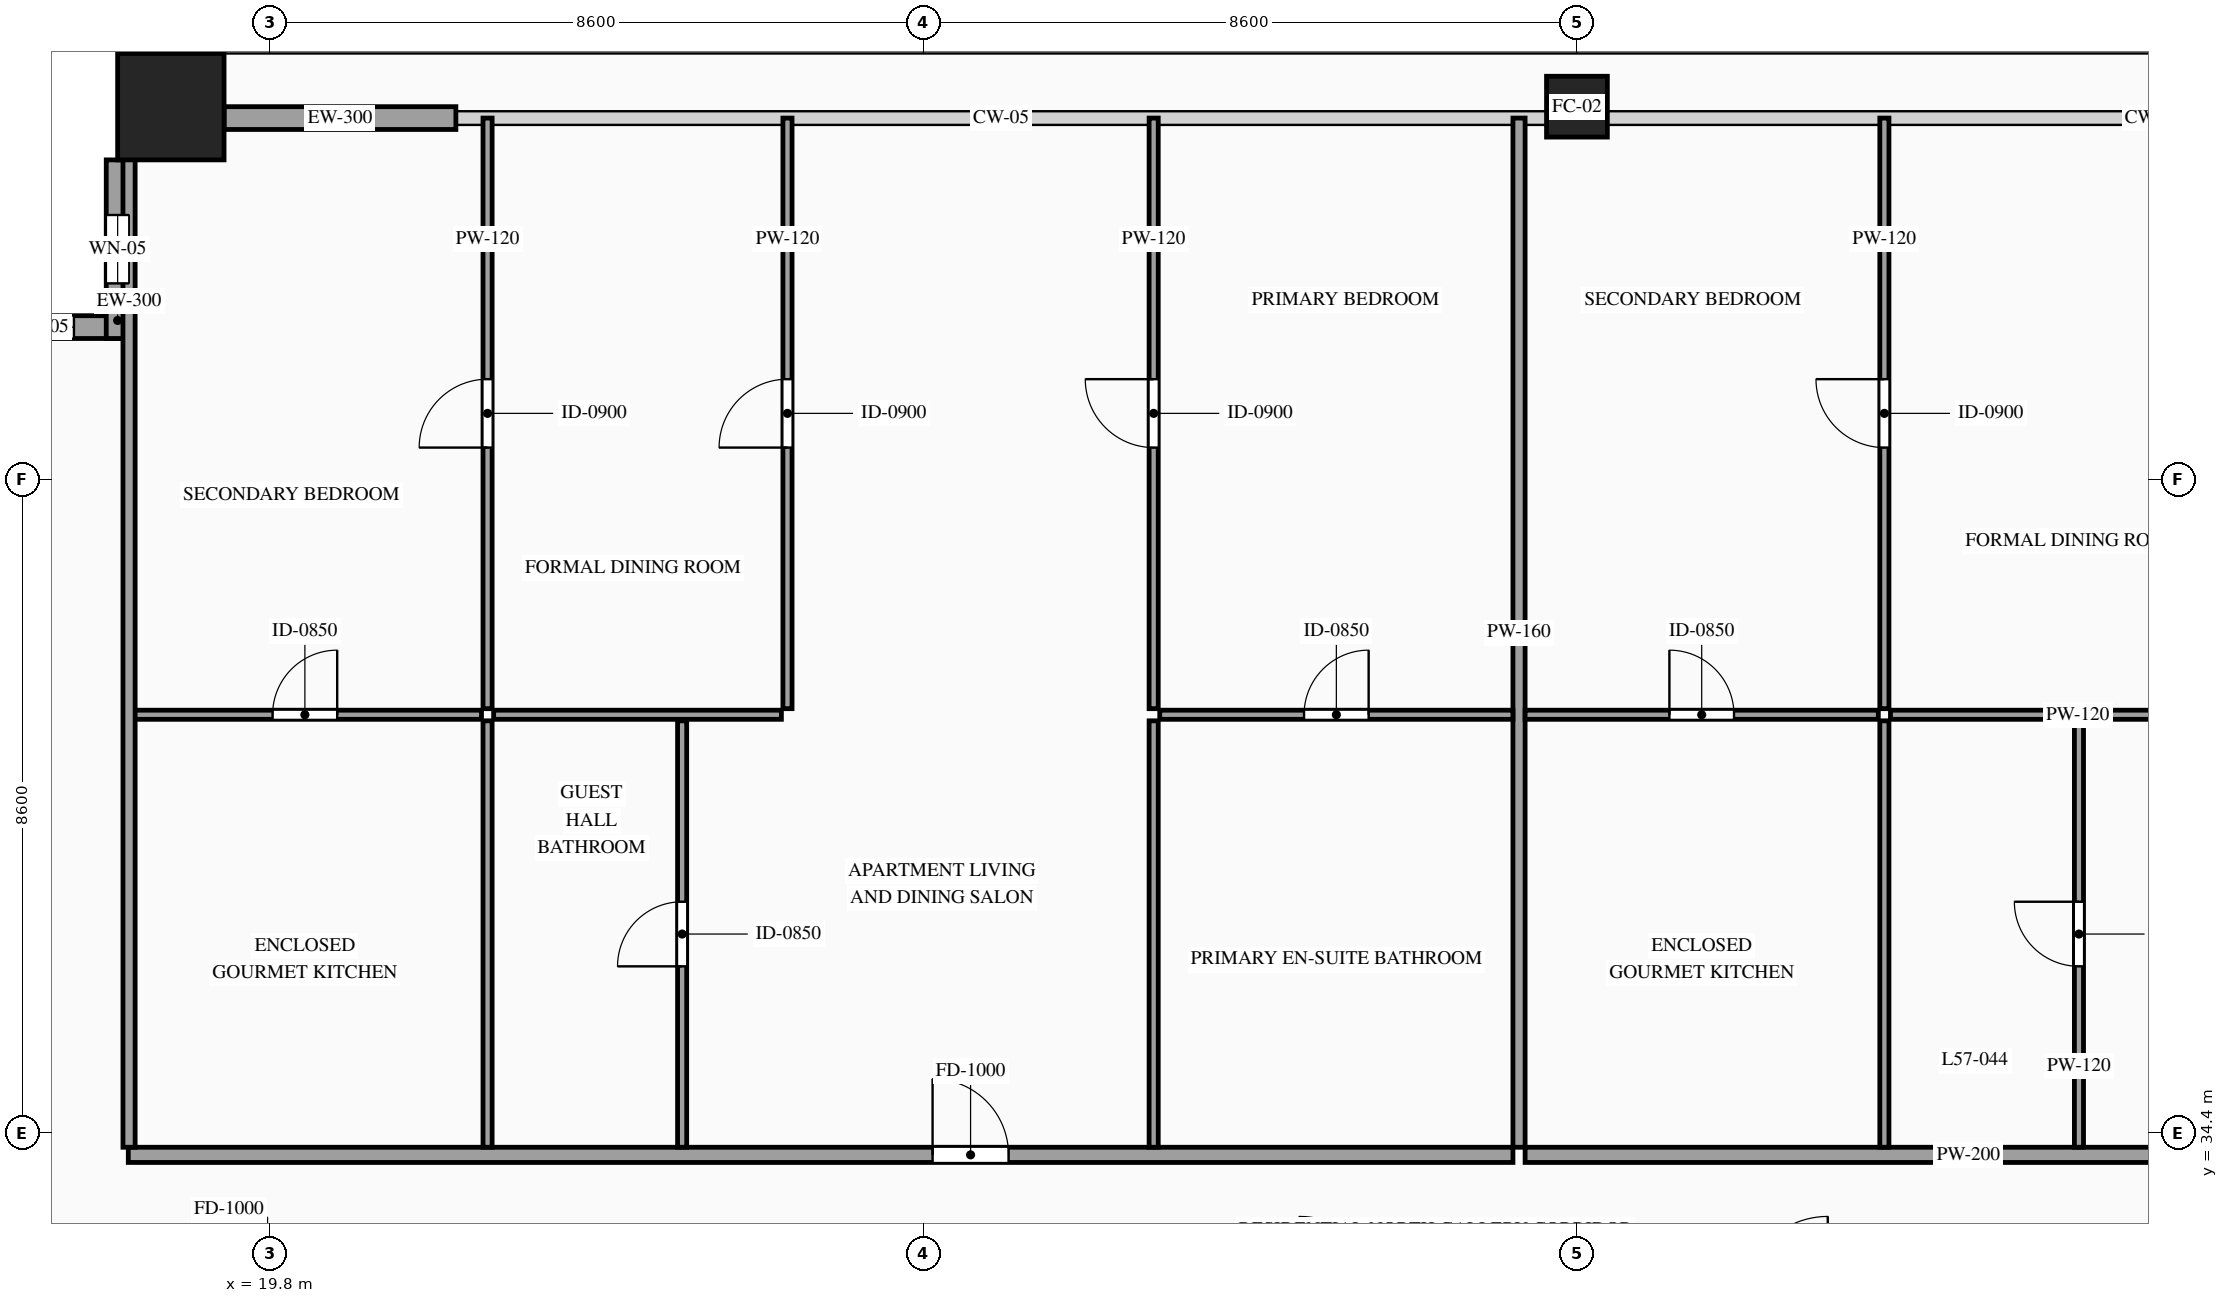
"""IFC4 building model, lengths in metres.
Left out: names, types, materials, properties, quantities, classifications, styles, units other than length and angle.
Written with IfcOpenShell. Run it as: python <this file> out.ifc"""

import sys

from ifc_helpers import new_model, si_unit, direction, frame, frame_2d, origin, origin_2d, place, context, subcontext, project, spatial, rectangle, hollow_rectangle, extrude, source, transform, mapped, element, fill, save


model = new_model("IFC4")
c1 = context("Model", 3, precision=1e-05, world=origin(), true_north=direction((0.0, 1.0)))
c2 = subcontext(c1, "Body", "Model", "MODEL_VIEW")
j1 = project(units=[si_unit("LENGTHUNIT", "METRE"), si_unit("PLANEANGLEUNIT", "RADIAN")], contexts=[c1])
p1 = place(None, origin())
s1 = spatial("IfcSite", under=j1, at=p1, CompositionType="ELEMENT")
p2 = place(p1, origin())
s2 = spatial("IfcBuilding", under=s1, at=p2, CompositionType="ELEMENT")
p3 = place(p2, frame((0.0, 0.0, 216.0)))
s3 = spatial("IfcBuildingStorey", under=s2, at=p3, CompositionType="ELEMENT", Elevation=216.0)
m1 = source(origin(), c2, "Body", "SweptSolid", [
    extrude(hollow_rectangle(XDim=1.4, YDim=1.4, WallThickness=0.06, at=origin_2d()), origin(), (0.0, 0.0, 1.0), 3.22),
])
p4 = place(p3, frame((18.5, 47.9, 0.0), z_axis=(0.0, 0.0, 1.0), x_axis=(1.0, 0.0, 0.0)))
e1 = element("IfcColumn", 1, at=p4, inside=s3, PredefinedType="COLUMN", context=c2, shape_type="MappedRepresentation", body=[
    mapped(m1, transform((0.0, 0.0, 0.0), scale=1.0)),
])
m2 = source(origin(), c2, "Body", "SweptSolid", [
    extrude(hollow_rectangle(XDim=0.8, YDim=0.8, WallThickness=0.036, at=origin_2d()), origin(), (0.0, 0.0, 1.0), 3.22),
])
p5 = place(p3, frame((37.0, 47.9, 0.0), z_axis=(0.0, 0.0, 1.0), x_axis=(1.0, 0.0, 0.0)))
e2 = element("IfcColumn", 2, at=p5, inside=s3, PredefinedType="COLUMN", context=c2, shape_type="MappedRepresentation", body=[
    mapped(m2, transform((0.0, 0.0, 0.0), scale=1.0)),
])
p6 = place(p3, frame((17.95, 45.0, 0.0), z_axis=(0.0, 0.0, 1.0), x_axis=(-1.0, 0.0, 0.0)))
e3 = element("IfcWall", 3, at=p6, inside=s3, PredefinedType="SOLIDWALL", context=c2, shape_type="SweptSolid", body=[
    extrude(rectangle(XDim=2.35, YDim=0.3, at=frame_2d((1.175, 0.0))), origin(), (0.0, 0.0, 1.0), 3.22),
])
p7 = place(p6, frame((0.725, 0.0, 0.75)))
e4 = element("IfcOpeningElement", 4, at=p7, cuts=e3, PredefinedType="OPENING", context=c2, shape_type="SweptSolid", body=[
    extrude(rectangle(XDim=0.9, YDim=1.5, at=frame_2d((0.45, 0.75))), frame((0.0, 0.165, 0.0), z_axis=(0.0, -1.0, 0.0), x_axis=(1.0, 0.0, 0.0)), (0.0, 0.0, 1.0), 0.33),
])
p8 = place(p3, frame((17.8, 47.2, 0.0), z_axis=(0.0, 0.0, 1.0), x_axis=(0.0, -1.0, 0.0)))
e5 = element("IfcWall", 5, at=p8, inside=s3, PredefinedType="SOLIDWALL", context=c2, shape_type="SweptSolid", body=[
    extrude(rectangle(XDim=2.35, YDim=0.3, at=frame_2d((1.175, 0.0))), origin(), (0.0, 0.0, 1.0), 3.22),
])
p9 = place(p8, frame((0.725, 0.0, 0.75)))
e6 = element("IfcOpeningElement", 6, at=p9, cuts=e5, PredefinedType="OPENING", context=c2, shape_type="SweptSolid", body=[
    extrude(rectangle(XDim=0.9, YDim=1.5, at=frame_2d((0.45, 0.75))), frame((0.0, 0.165, 0.0), z_axis=(0.0, -1.0, 0.0), x_axis=(1.0, 0.0, 0.0)), (0.0, 0.0, 1.0), 0.33),
])
m3 = source(origin(), c2, "Body", "SweptSolid", [
    extrude(rectangle(XDim=3.05, YDim=0.3, at=frame_2d((1.525, 0.0))), origin(), (0.0, 0.0, 1.0), 2.775),
])
p10 = place(p3, frame((19.2, 47.75, 0.0), z_axis=(0.0, 0.0, 1.0), x_axis=(1.0, 0.0, 0.0)))
e7 = element("IfcWall", 7, at=p10, inside=s3, PredefinedType="SOLIDWALL", context=c2, shape_type="MappedRepresentation", body=[
    mapped(m3, transform((0.0, 0.0, 0.0), scale=1.0)),
])
p11 = place(p3, frame((17.94, 34.11, 0.0), z_axis=(0.0, 0.0, 1.0), x_axis=(1.0, 0.0, 0.0)))
e8 = element("IfcWall", 8, at=p11, inside=s3, PredefinedType="PARTITIONING", context=c2, shape_type="SweptSolid", body=[
    extrude(rectangle(XDim=18.218, YDim=0.2, at=frame_2d((9.109, 0.0))), origin(), (0.0, 0.0, 1.0), 3.22),
])
p12 = place(p11, frame((10.582, 0.0, 0.0)))
e9 = element("IfcOpeningElement", 9, at=p12, cuts=e8, PredefinedType="OPENING", context=c2, shape_type="SweptSolid", body=[
    extrude(rectangle(XDim=1.0, YDim=2.2, at=frame_2d((0.5, 1.1))), frame((0.0, 0.115, 0.0), z_axis=(0.0, -1.0, 0.0), x_axis=(1.0, 0.0, 0.0)), (0.0, 0.0, 1.0), 0.23),
])
m4 = source(origin(), c2, "Body", "SweptSolid", [
    extrude(rectangle(XDim=13.54, YDim=0.16, at=frame_2d((6.77, 0.0))), origin(), (0.0, 0.0, 1.0), 3.22),
])
p13 = place(p3, frame((36.238, 34.21, 0.0), z_axis=(0.0, 0.0, 1.0), x_axis=(0.0, 1.0, 0.0)))
e10 = element("IfcWall", 10, at=p13, inside=s3, PredefinedType="PARTITIONING", context=c2, shape_type="MappedRepresentation", body=[
    mapped(m4, transform((0.0, 0.0, 0.0), scale=1.0)),
])
p14 = place(p3, frame((17.94, 39.9, 0.0), z_axis=(0.0, 0.0, 1.0), x_axis=(1.0, 0.0, 0.0)))
e11 = element("IfcWall", 11, at=p14, inside=s3, PredefinedType="PARTITIONING", context=c2, shape_type="SweptSolid", body=[
    extrude(rectangle(XDim=4.647, YDim=0.12, at=frame_2d((2.323, 0.0))), origin(), (0.0, 0.0, 1.0), 3.22),
])
p15 = place(p14, frame((1.898, 0.0, 0.0)))
e12 = element("IfcOpeningElement", 12, at=p15, cuts=e11, PredefinedType="OPENING", context=c2, shape_type="SweptSolid", body=[
    extrude(rectangle(XDim=0.85, YDim=2.1, at=frame_2d((0.425, 1.05))), frame((0.0, 0.075, 0.0), z_axis=(0.0, -1.0, 0.0), x_axis=(1.0, 0.0, 0.0)), (0.0, 0.0, 1.0), 0.15),
])
m5 = source(origin(), c2, "Body", "SweptSolid", [
    extrude(rectangle(XDim=5.61, YDim=0.12, at=frame_2d((2.805, 0.0))), origin(), (0.0, 0.0, 1.0), 1.615),
])
p16 = place(p3, frame((22.667, 34.21, 0.0), z_axis=(0.0, 0.0, 1.0), x_axis=(0.0, 1.0, 0.0)))
e13 = element("IfcWall", 13, at=p16, inside=s3, PredefinedType="PARTITIONING", context=c2, shape_type="MappedRepresentation", body=[
    mapped(m5, transform((0.0, 0.0, 0.0), scale=1.0)),
])
p17 = place(p3, frame((25.227, 34.21, 0.0), z_axis=(0.0, 0.0, 1.0), x_axis=(0.0, 1.0, 0.0)))
e14 = element("IfcWall", 14, at=p17, inside=s3, PredefinedType="PARTITIONING", context=c2, shape_type="SweptSolid", body=[
    extrude(rectangle(XDim=5.61, YDim=0.12, at=frame_2d((2.805, 0.0))), origin(), (0.0, 0.0, 1.0), 3.22),
])
p18 = place(p17, frame((2.38, 0.0, 0.0)))
e15 = element("IfcOpeningElement", 15, at=p18, cuts=e14, PredefinedType="OPENING", context=c2, shape_type="SweptSolid", body=[
    extrude(rectangle(XDim=0.85, YDim=2.1, at=frame_2d((0.425, 1.05))), frame((0.0, 0.075, 0.0), z_axis=(0.0, -1.0, 0.0), x_axis=(1.0, 0.0, 0.0)), (0.0, 0.0, 1.0), 0.15),
])
p19 = place(p3, frame((31.511, 39.9, 0.0), z_axis=(0.0, 0.0, 1.0), x_axis=(1.0, 0.0, 0.0)))
e16 = element("IfcWall", 16, at=p19, inside=s3, PredefinedType="PARTITIONING", context=c2, shape_type="SweptSolid", body=[
    extrude(rectangle(XDim=4.647, YDim=0.12, at=frame_2d((2.323, 0.0))), origin(), (0.0, 0.0, 1.0), 3.22),
])
p20 = place(p19, frame((1.898, 0.0, 0.0)))
e17 = element("IfcOpeningElement", 17, at=p20, cuts=e16, PredefinedType="OPENING", context=c2, shape_type="SweptSolid", body=[
    extrude(rectangle(XDim=0.85, YDim=2.1, at=frame_2d((0.425, 1.05))), frame((0.0, 0.075, 0.0), z_axis=(0.0, -1.0, 0.0), x_axis=(1.0, 0.0, 0.0)), (0.0, 0.0, 1.0), 0.15),
])
m6 = source(origin(), c2, "Body", "SweptSolid", [
    extrude(rectangle(XDim=5.61, YDim=0.12, at=frame_2d((2.805, 0.0))), origin(), (0.0, 0.0, 1.0), 3.22),
])
p21 = place(p3, frame((31.431, 34.21, 0.0), z_axis=(0.0, 0.0, 1.0), x_axis=(0.0, 1.0, 0.0)))
e18 = element("IfcWall", 18, at=p21, inside=s3, PredefinedType="PARTITIONING", context=c2, shape_type="MappedRepresentation", body=[
    mapped(m6, transform((0.0, 0.0, 0.0), scale=1.0)),
])
p22 = place(p3, frame((22.667, 39.98, 0.0), z_axis=(0.0, 0.0, 1.0), x_axis=(0.0, 1.0, 0.0)))
e19 = element("IfcWall", 19, at=p22, inside=s3, PredefinedType="PARTITIONING", context=c2, shape_type="SweptSolid", body=[
    extrude(rectangle(XDim=7.77, YDim=0.12, at=frame_2d((3.885, 0.0))), origin(), (0.0, 0.0, 1.0), 3.22),
])
p23 = place(p22, frame((3.435, 0.0, 0.0)))
e20 = element("IfcOpeningElement", 20, at=p23, cuts=e19, PredefinedType="OPENING", context=c2, shape_type="SweptSolid", body=[
    extrude(rectangle(XDim=0.9, YDim=2.15, at=frame_2d((0.45, 1.075))), frame((0.0, 0.075, 0.0), z_axis=(0.0, -1.0, 0.0), x_axis=(1.0, 0.0, 0.0)), (0.0, 0.0, 1.0), 0.15),
])
p24 = place(p3, frame((31.431, 39.98, 0.0), z_axis=(0.0, 0.0, 1.0), x_axis=(0.0, 1.0, 0.0)))
e21 = element("IfcWall", 21, at=p24, inside=s3, PredefinedType="PARTITIONING", context=c2, shape_type="SweptSolid", body=[
    extrude(rectangle(XDim=7.77, YDim=0.12, at=frame_2d((3.885, 0.0))), origin(), (0.0, 0.0, 1.0), 3.22),
])
p25 = place(p24, frame((3.435, 0.0, 0.0)))
e22 = element("IfcOpeningElement", 22, at=p25, cuts=e21, PredefinedType="OPENING", context=c2, shape_type="SweptSolid", body=[
    extrude(rectangle(XDim=0.9, YDim=2.15, at=frame_2d((0.45, 1.075))), frame((0.0, 0.075, 0.0), z_axis=(0.0, -1.0, 0.0), x_axis=(1.0, 0.0, 0.0)), (0.0, 0.0, 1.0), 0.15),
])
m7 = source(origin(), c2, "Body", "SweptSolid", [
    extrude(rectangle(XDim=3.786, YDim=0.12, at=frame_2d((1.893, 0.0))), origin(), (0.0, 0.0, 1.0), 3.22),
])
p26 = place(p3, frame((22.747, 39.9, 0.0), z_axis=(0.0, 0.0, 1.0), x_axis=(1.0, 0.0, 0.0)))
e23 = element("IfcWall", 23, at=p26, inside=s3, PredefinedType="PARTITIONING", context=c2, shape_type="MappedRepresentation", body=[
    mapped(m7, transform((0.0, 0.0, 0.0), scale=1.0)),
])
p27 = place(p3, frame((26.613, 39.98, 0.0), z_axis=(0.0, 0.0, 1.0), x_axis=(0.0, 1.0, 0.0)))
e24 = element("IfcWall", 24, at=p27, inside=s3, PredefinedType="PARTITIONING", context=c2, shape_type="SweptSolid", body=[
    extrude(rectangle(XDim=7.77, YDim=0.12, at=frame_2d((3.885, 0.0))), origin(), (0.0, 0.0, 1.0), 3.22),
])
p28 = place(p27, frame((3.435, 0.0, 0.0)))
e25 = element("IfcOpeningElement", 25, at=p28, cuts=e24, PredefinedType="OPENING", context=c2, shape_type="SweptSolid", body=[
    extrude(rectangle(XDim=0.9, YDim=2.15, at=frame_2d((0.45, 1.075))), frame((0.0, 0.075, 0.0), z_axis=(0.0, -1.0, 0.0), x_axis=(1.0, 0.0, 0.0)), (0.0, 0.0, 1.0), 0.15),
])
p29 = place(p3, frame((36.318, 34.11, 0.0), z_axis=(0.0, 0.0, 1.0), x_axis=(1.0, 0.0, 0.0)))
e26 = element("IfcWall", 26, at=p29, inside=s3, PredefinedType="PARTITIONING", context=c2, shape_type="SweptSolid", body=[
    extrude(rectangle(XDim=19.742, YDim=0.2, at=frame_2d((9.871, 0.0))), origin(), (0.0, 0.0, 1.0), 3.22),
])
p30 = place(p29, frame((11.915, 0.0, 0.0)))
e27 = element("IfcOpeningElement", 27, at=p30, cuts=e26, PredefinedType="OPENING", context=c2, shape_type="SweptSolid", body=[
    extrude(rectangle(XDim=1.0, YDim=2.2, at=frame_2d((0.5, 1.1))), frame((0.0, 0.115, 0.0), z_axis=(0.0, -1.0, 0.0), x_axis=(1.0, 0.0, 0.0)), (0.0, 0.0, 1.0), 0.23),
])
m8 = source(origin(), c2, "Body", "SweptSolid", [
    extrude(rectangle(XDim=13.39, YDim=0.16, at=frame_2d((6.695, 0.0))), origin(), (0.0, 0.0, 1.0), 3.22),
])
p31 = place(p3, frame((17.95, 34.21, 0.0), z_axis=(0.0, 0.0, 1.0), x_axis=(0.0, 1.0, 0.0)))
e28 = element("IfcWall", 28, at=p31, inside=s3, PredefinedType="PARTITIONING", context=c2, shape_type="MappedRepresentation", body=[
    mapped(m8, transform((0.0, 0.0, 0.0), scale=1.0)),
])
p32 = place(p3, frame((36.318, 39.9, 0.0), z_axis=(0.0, 0.0, 1.0), x_axis=(1.0, 0.0, 0.0)))
e29 = element("IfcWall", 29, at=p32, inside=s3, PredefinedType="PARTITIONING", context=c2, shape_type="SweptSolid", body=[
    extrude(rectangle(XDim=4.647, YDim=0.12, at=frame_2d((2.323, 0.0))), origin(), (0.0, 0.0, 1.0), 3.22),
])
p33 = place(p32, frame((1.898, 0.0, 0.0)))
e30 = element("IfcOpeningElement", 30, at=p33, cuts=e29, PredefinedType="OPENING", context=c2, shape_type="SweptSolid", body=[
    extrude(rectangle(XDim=0.85, YDim=2.1, at=frame_2d((0.425, 1.05))), frame((0.0, 0.075, 0.0), z_axis=(0.0, -1.0, 0.0), x_axis=(1.0, 0.0, 0.0)), (0.0, 0.0, 1.0), 0.15),
])
p34 = place(p3, frame((41.045, 34.21, 0.0), z_axis=(0.0, 0.0, 1.0), x_axis=(0.0, 1.0, 0.0)))
e31 = element("IfcWall", 31, at=p34, inside=s3, PredefinedType="PARTITIONING", context=c2, shape_type="MappedRepresentation", body=[
    mapped(m6, transform((0.0, 0.0, 0.0), scale=1.0)),
])
p35 = place(p3, frame((43.605, 34.21, 0.0), z_axis=(0.0, 0.0, 1.0), x_axis=(0.0, 1.0, 0.0)))
e32 = element("IfcWall", 32, at=p35, inside=s3, PredefinedType="PARTITIONING", context=c2, shape_type="SweptSolid", body=[
    extrude(rectangle(XDim=5.61, YDim=0.12, at=frame_2d((2.805, 0.0))), origin(), (0.0, 0.0, 1.0), 3.22),
])
p36 = place(p35, frame((2.38, 0.0, 0.0)))
e33 = element("IfcOpeningElement", 33, at=p36, cuts=e32, PredefinedType="OPENING", context=c2, shape_type="SweptSolid", body=[
    extrude(rectangle(XDim=0.85, YDim=2.1, at=frame_2d((0.425, 1.05))), frame((0.0, 0.075, 0.0), z_axis=(0.0, -1.0, 0.0), x_axis=(1.0, 0.0, 0.0)), (0.0, 0.0, 1.0), 0.15),
])
p37 = place(p3, frame((41.045, 39.98, 0.0), z_axis=(0.0, 0.0, 1.0), x_axis=(0.0, 1.0, 0.0)))
e34 = element("IfcWall", 34, at=p37, inside=s3, PredefinedType="PARTITIONING", context=c2, shape_type="SweptSolid", body=[
    extrude(rectangle(XDim=7.77, YDim=0.12, at=frame_2d((3.885, 0.0))), origin(), (0.0, 0.0, 1.0), 3.22),
])
p38 = place(p37, frame((3.435, 0.0, 0.0)))
e35 = element("IfcOpeningElement", 35, at=p38, cuts=e34, PredefinedType="OPENING", context=c2, shape_type="SweptSolid", body=[
    extrude(rectangle(XDim=0.9, YDim=2.15, at=frame_2d((0.45, 1.075))), frame((0.0, 0.075, 0.0), z_axis=(0.0, -1.0, 0.0), x_axis=(1.0, 0.0, 0.0)), (0.0, 0.0, 1.0), 0.15),
])
m9 = source(origin(), c2, "Body", "SweptSolid", [
    extrude(rectangle(XDim=4.928, YDim=0.12, at=frame_2d((2.464, 0.0))), origin(), (0.0, 0.0, 1.0), 3.22),
])
p39 = place(p3, frame((41.125, 39.9, 0.0), z_axis=(0.0, 0.0, 1.0), x_axis=(1.0, 0.0, 0.0)))
e36 = element("IfcWall", 36, at=p39, inside=s3, PredefinedType="PARTITIONING", context=c2, shape_type="MappedRepresentation", body=[
    mapped(m9, transform((0.0, 0.0, 0.0), scale=1.0)),
])
m10 = source(origin(), c2, "Body", "SweptSolid", [
    extrude(rectangle(XDim=0.9, YDim=1.5, at=frame_2d((0.45, 0.75))), frame((0.0, 0.03, 0.0), z_axis=(0.0, -1.0, 0.0), x_axis=(1.0, 0.0, 0.0)), (0.0, 0.0, 1.0), 0.06),
])
p40 = place(p7, origin())
e37 = element("IfcWindow", 37, at=p40, inside=s3, PartitioningType="SINGLE_PANEL", PredefinedType="WINDOW", context=c2, shape_type="MappedRepresentation", body=[
    mapped(m10, transform((0.0, 0.0, 0.0), scale=1.0)),
])
fill(e4, e37)
p41 = place(p9, origin())
e38 = element("IfcWindow", 38, at=p41, inside=s3, PartitioningType="SINGLE_PANEL", PredefinedType="WINDOW", context=c2, shape_type="MappedRepresentation", body=[
    mapped(m10, transform((0.0, 0.0, 0.0), scale=1.0)),
])
fill(e6, e38)
m11 = source(origin(), c2, "Body", "SweptSolid", [
    extrude(rectangle(XDim=1.0, YDim=2.2, at=frame_2d((0.5, 1.1))), frame((0.0, 0.025, 0.0), z_axis=(0.0, -1.0, 0.0), x_axis=(1.0, 0.0, 0.0)), (0.0, 0.0, 1.0), 0.05),
])
p42 = place(p12, origin())
e39 = element("IfcDoor", 39, at=p42, inside=s3, OperationType="SINGLE_SWING_LEFT", PredefinedType="DOOR", context=c2, shape_type="MappedRepresentation", body=[
    mapped(m11, transform((0.0, 0.0, 0.0), scale=1.0)),
])
fill(e9, e39)
m12 = source(origin(), c2, "Body", "SweptSolid", [
    extrude(rectangle(XDim=0.85, YDim=2.1, at=frame_2d((0.425, 1.05))), frame((0.0, 0.025, 0.0), z_axis=(0.0, -1.0, 0.0), x_axis=(1.0, 0.0, 0.0)), (0.0, 0.0, 1.0), 0.05),
])
p43 = place(p15, origin())
e40 = element("IfcDoor", 40, at=p43, inside=s3, OperationType="SINGLE_SWING_RIGHT", PredefinedType="DOOR", context=c2, shape_type="MappedRepresentation", body=[
    mapped(m12, transform((0.0, 0.0, 0.0), scale=1.0)),
])
fill(e12, e40)
p44 = place(p18, origin())
e41 = element("IfcDoor", 41, at=p44, inside=s3, OperationType="SINGLE_SWING_LEFT", PredefinedType="DOOR", context=c2, shape_type="MappedRepresentation", body=[
    mapped(m12, transform((0.0, 0.0, 0.0), scale=1.0)),
])
fill(e15, e41)
p45 = place(p20, origin())
e42 = element("IfcDoor", 42, at=p45, inside=s3, OperationType="SINGLE_SWING_RIGHT", PredefinedType="DOOR", context=c2, shape_type="MappedRepresentation", body=[
    mapped(m12, transform((0.0, 0.0, 0.0), scale=1.0)),
])
fill(e17, e42)
m13 = source(origin(), c2, "Body", "SweptSolid", [
    extrude(rectangle(XDim=0.9, YDim=2.15, at=frame_2d((0.45, 1.075))), frame((0.0, 0.025, 0.0), z_axis=(0.0, -1.0, 0.0), x_axis=(1.0, 0.0, 0.0)), (0.0, 0.0, 1.0), 0.05),
])
p46 = place(p23, origin())
e43 = element("IfcDoor", 43, at=p46, inside=s3, OperationType="SINGLE_SWING_LEFT", PredefinedType="DOOR", context=c2, shape_type="MappedRepresentation", body=[
    mapped(m13, transform((0.0, 0.0, 0.0), scale=1.0)),
])
fill(e20, e43)
p47 = place(p25, origin())
e44 = element("IfcDoor", 44, at=p47, inside=s3, OperationType="SINGLE_SWING_RIGHT", PredefinedType="DOOR", context=c2, shape_type="MappedRepresentation", body=[
    mapped(m13, transform((0.0, 0.0, 0.0), scale=1.0)),
])
fill(e22, e44)
p48 = place(p28, origin())
e45 = element("IfcDoor", 45, at=p48, inside=s3, OperationType="SINGLE_SWING_LEFT", PredefinedType="DOOR", context=c2, shape_type="MappedRepresentation", body=[
    mapped(m13, transform((0.0, 0.0, 0.0), scale=1.0)),
])
fill(e25, e45)
p49 = place(p33, origin())
e46 = element("IfcDoor", 46, at=p49, inside=s3, OperationType="SINGLE_SWING_LEFT", PredefinedType="DOOR", context=c2, shape_type="MappedRepresentation", body=[
    mapped(m12, transform((0.0, 0.0, 0.0), scale=1.0)),
])
fill(e30, e46)
p50 = place(p36, origin())
e47 = element("IfcDoor", 47, at=p50, inside=s3, OperationType="SINGLE_SWING_RIGHT", PredefinedType="DOOR", context=c2, shape_type="MappedRepresentation", body=[
    mapped(m12, transform((0.0, 0.0, 0.0), scale=1.0)),
])
fill(e33, e47)
p51 = place(p38, origin())
e48 = element("IfcDoor", 48, at=p51, inside=s3, OperationType="SINGLE_SWING_RIGHT", PredefinedType="DOOR", context=c2, shape_type="MappedRepresentation", body=[
    mapped(m13, transform((0.0, 0.0, 0.0), scale=1.0)),
])
fill(e35, e48)
save(model, sys.argv[1])
